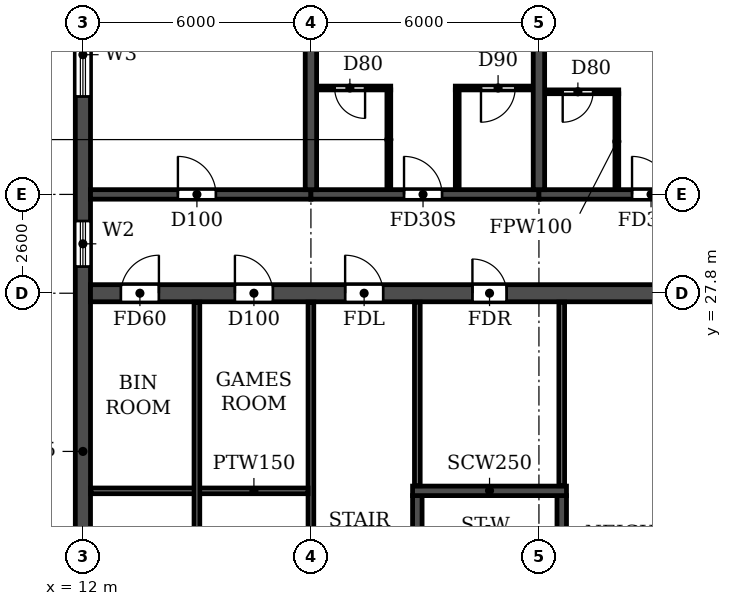
"""IFC4 building model, lengths in metres.
Left out: names, types, materials, properties, quantities, classifications, styles, units other than length and angle.
Written with IfcOpenShell. Run it as: python <this file> out.ifc"""

import sys

from ifc_helpers import new_model, si_unit, direction, frame, frame_2d, origin, place, context, subcontext, project, spatial, rectangle, extrude, element, fill, save


model = new_model("IFC4")
c1 = context("Model", 3, precision=1e-05, world=origin(), true_north=direction((0.0, 1.0)))
c2 = subcontext(c1, "Body", "Model", "MODEL_VIEW")
j1 = project(units=[si_unit("LENGTHUNIT", "METRE"), si_unit("PLANEANGLEUNIT", "RADIAN")], contexts=[c1])
p1 = place(None, origin())
s1 = spatial("IfcSite", under=j1, at=p1, CompositionType="ELEMENT")
p2 = place(p1, origin())
s2 = spatial("IfcBuilding", under=s1, at=p2, CompositionType="ELEMENT")
p3 = place(p2, frame((0.0, 0.0, 125.7)))
s3 = spatial("IfcBuildingStorey", under=s2, at=p3, CompositionType="ELEMENT", Elevation=125.7)
for number, where, z_axis, x_axis in (
    (1, (18.0, 30.525, 0.0), (0.0, 0.0, 1.0), (0.0, 1.0, 0.0)),
    (2, (24.0, 30.525, 0.0), (0.0, 0.0, 1.0), (0.0, 1.0, 0.0)),
):
    element("IfcWall", number, at=place(p3, frame(where, z_axis=z_axis, x_axis=x_axis)), inside=s3, PredefinedType="SHEAR", context=c2, shape_type="SweptSolid", body=[
        extrude(rectangle(XDim=11.675, YDim=0.3, at=frame_2d((5.837, 0.0))), origin(), (0.0, 0.0, 1.0), 3.07),
    ])
p4 = place(p3, frame((12.0, 4.683, 0.0), z_axis=(0.0, 0.0, 1.0), x_axis=(0.0, 1.0, 0.0)))
e3 = element("IfcWall", 3, at=p4, inside=s3, PredefinedType="SHEAR", context=c2, shape_type="SweptSolid", body=[
    extrude(rectangle(XDim=33.034, YDim=0.4, at=frame_2d((16.517, 0.0))), origin(), (0.0, 0.0, 1.0), 3.07),
])
p5 = place(p4, frame((23.817, 0.0, 0.9)))
e4 = element("IfcOpeningElement", 4, at=p5, cuts=e3, PredefinedType="OPENING", context=c2, shape_type="SweptSolid", body=[
    extrude(rectangle(XDim=1.2, YDim=1.5, at=frame_2d((0.6, 0.75))), frame((0.0, 0.21, 0.0), z_axis=(0.0, -1.0, 0.0), x_axis=(1.0, 0.0, 0.0)), (0.0, 0.0, 1.0), 0.42),
])
p6 = place(p4, frame((8.017, 0.0, 0.9)))
e5 = element("IfcOpeningElement", 5, at=p6, cuts=e3, PredefinedType="OPENING", context=c2, shape_type="SweptSolid", body=[
    extrude(rectangle(XDim=1.2, YDim=1.5, at=frame_2d((0.6, 0.75))), frame((0.0, 0.21, 0.0), z_axis=(0.0, -1.0, 0.0), x_axis=(1.0, 0.0, 0.0)), (0.0, 0.0, 1.0), 0.42),
])
p7 = place(p4, frame((28.293, 0.0, 0.6)))
e6 = element("IfcOpeningElement", 6, at=p7, cuts=e3, PredefinedType="OPENING", context=c2, shape_type="SweptSolid", body=[
    extrude(rectangle(XDim=2.2, YDim=1.8, at=frame_2d((1.1, 0.9))), frame((0.0, 0.21, 0.0), z_axis=(0.0, -1.0, 0.0), x_axis=(1.0, 0.0, 0.0)), (0.0, 0.0, 1.0), 0.42),
])
p8 = place(p4, frame((2.541, 0.0, 0.6)))
e7 = element("IfcOpeningElement", 7, at=p8, cuts=e3, PredefinedType="OPENING", context=c2, shape_type="SweptSolid", body=[
    extrude(rectangle(XDim=2.2, YDim=1.8, at=frame_2d((1.1, 0.9))), frame((0.0, 0.21, 0.0), z_axis=(0.0, -1.0, 0.0), x_axis=(1.0, 0.0, 0.0)), (0.0, 0.0, 1.0), 0.42),
])
p9 = place(p4, frame((12.817, 0.0, 0.6)))
e8 = element("IfcOpeningElement", 8, at=p9, cuts=e3, PredefinedType="OPENING", context=c2, shape_type="SweptSolid", body=[
    extrude(rectangle(XDim=2.2, YDim=1.8, at=frame_2d((1.1, 0.9))), frame((0.0, 0.21, 0.0), z_axis=(0.0, -1.0, 0.0), x_axis=(1.0, 0.0, 0.0)), (0.0, 0.0, 1.0), 0.42),
])
p10 = place(p3, frame((12.2, 30.4, 0.0), z_axis=(0.0, 0.0, 1.0), x_axis=(1.0, 0.0, 0.0)))
e9 = element("IfcWall", 9, at=p10, inside=s3, PredefinedType="SHEAR", context=c2, shape_type="SweptSolid", body=[
    extrude(rectangle(XDim=5.8, YDim=0.25, at=frame_2d((2.9, 0.0))), origin(), (0.0, 0.0, 1.0), 2.47),
])
p11 = place(p10, frame((2.3, 0.0, 0.0)))
e10 = element("IfcOpeningElement", 10, at=p11, cuts=e9, PredefinedType="OPENING", context=c2, shape_type="SweptSolid", body=[
    extrude(rectangle(XDim=1.0, YDim=2.1, at=frame_2d((0.5, 1.05))), frame((0.0, 0.135, 0.0), z_axis=(0.0, -1.0, 0.0), x_axis=(1.0, 0.0, 0.0)), (0.0, 0.0, 1.0), 0.27),
])
p12 = place(p3, frame((18.0, 30.4, 0.0), z_axis=(0.0, 0.0, 1.0), x_axis=(1.0, 0.0, 0.0)))
e11 = element("IfcWall", 11, at=p12, inside=s3, PredefinedType="SHEAR", context=c2, shape_type="SweptSolid", body=[
    extrude(rectangle(XDim=6.0, YDim=0.25, at=frame_2d((3.0, 0.0))), origin(), (0.0, 0.0, 1.0), 2.47),
])
p13 = place(p12, frame((2.45, 0.0, 0.0)))
e12 = element("IfcOpeningElement", 12, at=p13, cuts=e11, PredefinedType="OPENING", context=c2, shape_type="SweptSolid", body=[
    extrude(rectangle(XDim=1.0, YDim=2.1, at=frame_2d((0.5, 1.05))), frame((0.0, 0.135, 0.0), z_axis=(0.0, -1.0, 0.0), x_axis=(1.0, 0.0, 0.0)), (0.0, 0.0, 1.0), 0.27),
])
p14 = place(p3, frame((24.0, 30.4, 0.0), z_axis=(0.0, 0.0, 1.0), x_axis=(1.0, 0.0, 0.0)))
e13 = element("IfcWall", 13, at=p14, inside=s3, PredefinedType="SHEAR", context=c2, shape_type="SweptSolid", body=[
    extrude(rectangle(XDim=6.0, YDim=0.25, at=frame_2d((3.0, 0.0))), origin(), (0.0, 0.0, 1.0), 2.47),
])
p15 = place(p14, frame((2.45, 0.0, 0.0)))
e14 = element("IfcOpeningElement", 14, at=p15, cuts=e13, PredefinedType="OPENING", context=c2, shape_type="SweptSolid", body=[
    extrude(rectangle(XDim=1.0, YDim=2.1, at=frame_2d((0.5, 1.05))), frame((0.0, 0.135, 0.0), z_axis=(0.0, -1.0, 0.0), x_axis=(1.0, 0.0, 0.0)), (0.0, 0.0, 1.0), 0.27),
])
p16 = place(p3, frame((12.2, 27.8, 0.0), z_axis=(0.0, 0.0, 1.0), x_axis=(1.0, 0.0, 0.0)))
e15 = element("IfcWall", 15, at=p16, inside=s3, PredefinedType="SOLIDWALL", context=c2, shape_type="SweptSolid", body=[
    extrude(rectangle(XDim=77.6, YDim=0.45, at=frame_2d((38.8, 0.0))), origin(), (0.0, 0.0, 1.0), 3.07),
])
p17 = place(p16, frame((0.8, 0.0, 0.0)))
e16 = element("IfcOpeningElement", 16, at=p17, cuts=e15, PredefinedType="OPENING", context=c2, shape_type="SweptSolid", body=[
    extrude(rectangle(XDim=1.0, YDim=2.1, at=frame_2d((0.5, 1.05))), frame((0.0, 0.235, 0.0), z_axis=(0.0, -1.0, 0.0), x_axis=(1.0, 0.0, 0.0)), (0.0, 0.0, 1.0), 0.47),
])
p18 = place(p16, frame((3.8, 0.0, 0.0)))
e17 = element("IfcOpeningElement", 17, at=p18, cuts=e15, PredefinedType="OPENING", context=c2, shape_type="SweptSolid", body=[
    extrude(rectangle(XDim=1.0, YDim=2.1, at=frame_2d((0.5, 1.05))), frame((0.0, 0.235, 0.0), z_axis=(0.0, -1.0, 0.0), x_axis=(1.0, 0.0, 0.0)), (0.0, 0.0, 1.0), 0.47),
])
p19 = place(p16, frame((6.7, 0.0, 0.0)))
e18 = element("IfcOpeningElement", 18, at=p19, cuts=e15, PredefinedType="OPENING", context=c2, shape_type="SweptSolid", body=[
    extrude(rectangle(XDim=1.0, YDim=2.1, at=frame_2d((0.5, 1.05))), frame((0.0, 0.235, 0.0), z_axis=(0.0, -1.0, 0.0), x_axis=(1.0, 0.0, 0.0)), (0.0, 0.0, 1.0), 0.47),
])
p20 = place(p16, frame((10.05, 0.0, 0.0)))
e19 = element("IfcOpeningElement", 19, at=p20, cuts=e15, PredefinedType="OPENING", context=c2, shape_type="SweptSolid", body=[
    extrude(rectangle(XDim=0.9, YDim=2.1, at=frame_2d((0.45, 1.05))), frame((0.0, 0.235, 0.0), z_axis=(0.0, -1.0, 0.0), x_axis=(1.0, 0.0, 0.0)), (0.0, 0.0, 1.0), 0.47),
])
p21 = place(p16, frame((19.25, 0.0, 0.0)))
e20 = element("IfcOpeningElement", 20, at=p21, cuts=e15, PredefinedType="OPENING", context=c2, shape_type="SweptSolid", body=[
    extrude(rectangle(XDim=0.9, YDim=2.1, at=frame_2d((0.45, 1.05))), frame((0.0, 0.235, 0.0), z_axis=(0.0, -1.0, 0.0), x_axis=(1.0, 0.0, 0.0)), (0.0, 0.0, 1.0), 0.47),
])
p22 = place(p16, frame((25.0, 0.0, 0.0)))
e21 = element("IfcOpeningElement", 21, at=p22, cuts=e15, PredefinedType="OPENING", context=c2, shape_type="SweptSolid", body=[
    extrude(rectangle(XDim=1.0, YDim=2.1, at=frame_2d((0.5, 1.05))), frame((0.0, 0.235, 0.0), z_axis=(0.0, -1.0, 0.0), x_axis=(1.0, 0.0, 0.0)), (0.0, 0.0, 1.0), 0.47),
])
p23 = place(p16, frame((30.2, 0.0, 0.0)))
e22 = element("IfcOpeningElement", 22, at=p23, cuts=e15, PredefinedType="OPENING", context=c2, shape_type="SweptSolid", body=[
    extrude(rectangle(XDim=1.0, YDim=2.1, at=frame_2d((0.5, 1.05))), frame((0.0, 0.235, 0.0), z_axis=(0.0, -1.0, 0.0), x_axis=(1.0, 0.0, 0.0)), (0.0, 0.0, 1.0), 0.47),
])
p24 = place(p16, frame((35.4, 0.0, 0.0)))
e23 = element("IfcOpeningElement", 23, at=p24, cuts=e15, PredefinedType="OPENING", context=c2, shape_type="SweptSolid", body=[
    extrude(rectangle(XDim=1.0, YDim=2.1, at=frame_2d((0.5, 1.05))), frame((0.0, 0.235, 0.0), z_axis=(0.0, -1.0, 0.0), x_axis=(1.0, 0.0, 0.0)), (0.0, 0.0, 1.0), 0.47),
])
p25 = place(p16, frame((38.3, 0.0, 0.0)))
e24 = element("IfcOpeningElement", 24, at=p25, cuts=e15, PredefinedType="OPENING", context=c2, shape_type="SweptSolid", body=[
    extrude(rectangle(XDim=1.0, YDim=2.1, at=frame_2d((0.5, 1.05))), frame((0.0, 0.235, 0.0), z_axis=(0.0, -1.0, 0.0), x_axis=(1.0, 0.0, 0.0)), (0.0, 0.0, 1.0), 0.47),
])
p26 = place(p16, frame((42.5, 0.0, 0.0)))
e25 = element("IfcOpeningElement", 25, at=p26, cuts=e15, PredefinedType="OPENING", context=c2, shape_type="SweptSolid", body=[
    extrude(rectangle(XDim=1.0, YDim=2.1, at=frame_2d((0.5, 1.05))), frame((0.0, 0.235, 0.0), z_axis=(0.0, -1.0, 0.0), x_axis=(1.0, 0.0, 0.0)), (0.0, 0.0, 1.0), 0.47),
])
p27 = place(p16, frame((46.4, 0.0, 0.0)))
e26 = element("IfcOpeningElement", 26, at=p27, cuts=e15, PredefinedType="OPENING", context=c2, shape_type="SweptSolid", body=[
    extrude(rectangle(XDim=1.0, YDim=2.1, at=frame_2d((0.5, 1.05))), frame((0.0, 0.235, 0.0), z_axis=(0.0, -1.0, 0.0), x_axis=(1.0, 0.0, 0.0)), (0.0, 0.0, 1.0), 0.47),
])
p28 = place(p16, frame((49.0, 0.0, 0.0)))
e27 = element("IfcOpeningElement", 27, at=p28, cuts=e15, PredefinedType="OPENING", context=c2, shape_type="SweptSolid", body=[
    extrude(rectangle(XDim=1.0, YDim=2.1, at=frame_2d((0.5, 1.05))), frame((0.0, 0.235, 0.0), z_axis=(0.0, -1.0, 0.0), x_axis=(1.0, 0.0, 0.0)), (0.0, 0.0, 1.0), 0.47),
])
p29 = place(p16, frame((52.65, 0.0, 0.0)))
e28 = element("IfcOpeningElement", 28, at=p29, cuts=e15, PredefinedType="OPENING", context=c2, shape_type="SweptSolid", body=[
    extrude(rectangle(XDim=1.5, YDim=2.1, at=frame_2d((0.75, 1.05))), frame((0.0, 0.235, 0.0), z_axis=(0.0, -1.0, 0.0), x_axis=(1.0, 0.0, 0.0)), (0.0, 0.0, 1.0), 0.47),
])
p30 = place(p16, frame((57.45, 0.0, 0.0)))
e29 = element("IfcOpeningElement", 29, at=p30, cuts=e15, PredefinedType="OPENING", context=c2, shape_type="SweptSolid", body=[
    extrude(rectangle(XDim=0.9, YDim=2.1, at=frame_2d((0.45, 1.05))), frame((0.0, 0.235, 0.0), z_axis=(0.0, -1.0, 0.0), x_axis=(1.0, 0.0, 0.0)), (0.0, 0.0, 1.0), 0.47),
])
p31 = place(p16, frame((66.65, 0.0, 0.0)))
e30 = element("IfcOpeningElement", 30, at=p31, cuts=e15, PredefinedType="OPENING", context=c2, shape_type="SweptSolid", body=[
    extrude(rectangle(XDim=0.9, YDim=2.1, at=frame_2d((0.45, 1.05))), frame((0.0, 0.235, 0.0), z_axis=(0.0, -1.0, 0.0), x_axis=(1.0, 0.0, 0.0)), (0.0, 0.0, 1.0), 0.47),
])
p32 = place(p16, frame((69.9, 0.0, 0.0)))
e31 = element("IfcOpeningElement", 31, at=p32, cuts=e15, PredefinedType="OPENING", context=c2, shape_type="SweptSolid", body=[
    extrude(rectangle(XDim=1.0, YDim=2.1, at=frame_2d((0.5, 1.05))), frame((0.0, 0.235, 0.0), z_axis=(0.0, -1.0, 0.0), x_axis=(1.0, 0.0, 0.0)), (0.0, 0.0, 1.0), 0.47),
])
p33 = place(p16, frame((72.8, 0.0, 0.0)))
e32 = element("IfcOpeningElement", 32, at=p33, cuts=e15, PredefinedType="OPENING", context=c2, shape_type="SweptSolid", body=[
    extrude(rectangle(XDim=1.0, YDim=2.1, at=frame_2d((0.5, 1.05))), frame((0.0, 0.235, 0.0), z_axis=(0.0, -1.0, 0.0), x_axis=(1.0, 0.0, 0.0)), (0.0, 0.0, 1.0), 0.47),
])
p34 = place(p16, frame((75.8, 0.0, 0.0)))
e33 = element("IfcOpeningElement", 33, at=p34, cuts=e15, PredefinedType="OPENING", context=c2, shape_type="SweptSolid", body=[
    extrude(rectangle(XDim=1.0, YDim=2.1, at=frame_2d((0.5, 1.05))), frame((0.0, 0.235, 0.0), z_axis=(0.0, -1.0, 0.0), x_axis=(1.0, 0.0, 0.0)), (0.0, 0.0, 1.0), 0.47),
])
p35 = place(p3, frame((20.8, 14.825, 0.0), z_axis=(0.0, 0.0, 1.0), x_axis=(0.0, 1.0, 0.0)))
e34 = element("IfcWall", 34, at=p35, inside=s3, PredefinedType="SOLIDWALL", context=c2, shape_type="SweptSolid", body=[
    extrude(rectangle(XDim=7.65, YDim=0.25, at=frame_2d((3.825, 0.0))), origin(), (0.0, 0.0, 1.0), 3.07),
])
p36 = place(p35, frame((0.475, 0.0, 0.0)))
e35 = element("IfcOpeningElement", 35, at=p36, cuts=e34, PredefinedType="OPENING", context=c2, shape_type="SweptSolid", body=[
    extrude(rectangle(XDim=1.0, YDim=2.1, at=frame_2d((0.5, 1.05))), frame((0.0, 0.135, 0.0), z_axis=(0.0, -1.0, 0.0), x_axis=(1.0, 0.0, 0.0)), (0.0, 0.0, 1.0), 0.27),
])
p37 = place(p3, frame((24.6, 14.825, 0.0), z_axis=(0.0, 0.0, 1.0), x_axis=(0.0, 1.0, 0.0)))
e36 = element("IfcWall", 36, at=p37, inside=s3, PredefinedType="SOLIDWALL", context=c2, shape_type="SweptSolid", body=[
    extrude(rectangle(XDim=7.65, YDim=0.25, at=frame_2d((3.825, 0.0))), origin(), (0.0, 0.0, 1.0), 3.07),
])
p38 = place(p3, frame((20.675, 22.6, 0.0), z_axis=(0.0, 0.0, 1.0), x_axis=(1.0, 0.0, 0.0)))
e37 = element("IfcWall", 37, at=p38, inside=s3, PredefinedType="SOLIDWALL", context=c2, shape_type="SweptSolid", body=[
    extrude(rectangle(XDim=4.05, YDim=0.25, at=frame_2d((2.025, 0.0))), origin(), (0.0, 0.0, 1.0), 3.07),
])
p39 = place(p3, frame((18.0, 14.835, 0.0), z_axis=(0.0, 0.0, 1.0), x_axis=(0.0, 1.0, 0.0)))
e38 = element("IfcWall", 38, at=p39, inside=s3, PredefinedType="PARTITIONING", context=c2, shape_type="SweptSolid", body=[
    extrude(rectangle(XDim=12.73, YDim=0.15, at=frame_2d((6.365, 0.0))), origin(), (0.0, 0.0, 1.0), 3.07),
])
p40 = place(p3, frame((24.16, 33.1, 0.0), z_axis=(0.0, 0.0, 1.0), x_axis=(1.0, 0.0, 0.0)))
e39 = element("IfcWall", 39, at=p40, inside=s3, PredefinedType="PARTITIONING", context=c2, shape_type="SweptSolid", body=[
    extrude(rectangle(XDim=1.94, YDim=0.1, at=frame_2d((0.97, 0.0))), origin(), (0.0, 0.0, 1.0), 3.07),
])
p41 = place(p40, frame((0.465, 0.0, 0.0)))
e40 = element("IfcOpeningElement", 40, at=p41, cuts=e39, PredefinedType="OPENING", context=c2, shape_type="SweptSolid", body=[
    extrude(rectangle(XDim=0.8, YDim=2.1, at=frame_2d((0.4, 1.05))), frame((0.0, 0.06, 0.0), z_axis=(0.0, -1.0, 0.0), x_axis=(1.0, 0.0, 0.0)), (0.0, 0.0, 1.0), 0.12),
])
p42 = place(p3, frame((18.16, 33.2, 0.0), z_axis=(0.0, 0.0, 1.0), x_axis=(1.0, 0.0, 0.0)))
e41 = element("IfcWall", 41, at=p42, inside=s3, PredefinedType="PARTITIONING", context=c2, shape_type="SweptSolid", body=[
    extrude(rectangle(XDim=1.94, YDim=0.1, at=frame_2d((0.97, 0.0))), origin(), (0.0, 0.0, 1.0), 3.07),
])
p43 = place(p42, frame((0.465, 0.0, 0.0)))
e42 = element("IfcOpeningElement", 42, at=p43, cuts=e41, PredefinedType="OPENING", context=c2, shape_type="SweptSolid", body=[
    extrude(rectangle(XDim=0.8, YDim=2.1, at=frame_2d((0.4, 1.05))), frame((0.0, 0.06, 0.0), z_axis=(0.0, -1.0, 0.0), x_axis=(1.0, 0.0, 0.0)), (0.0, 0.0, 1.0), 0.12),
])
p44 = place(p3, frame((21.8, 33.2, 0.0), z_axis=(0.0, 0.0, 1.0), x_axis=(1.0, 0.0, 0.0)))
e43 = element("IfcWall", 43, at=p44, inside=s3, PredefinedType="PARTITIONING", context=c2, shape_type="SweptSolid", body=[
    extrude(rectangle(XDim=2.04, YDim=0.1, at=frame_2d((1.02, 0.0))), origin(), (0.0, 0.0, 1.0), 3.07),
])
p45 = place(p44, frame((0.675, 0.0, 0.0)))
e44 = element("IfcOpeningElement", 44, at=p45, cuts=e43, PredefinedType="OPENING", context=c2, shape_type="SweptSolid", body=[
    extrude(rectangle(XDim=0.9, YDim=2.1, at=frame_2d((0.45, 1.05))), frame((0.0, 0.06, 0.0), z_axis=(0.0, -1.0, 0.0), x_axis=(1.0, 0.0, 0.0)), (0.0, 0.0, 1.0), 0.12),
])
for number, where, z_axis, x_axis in (
    (45, (20.05, 30.535, 0.0), (0.0, 0.0, 1.0), (0.0, 1.0, 0.0)),
    (46, (21.85, 30.535, 0.0), (0.0, 0.0, 1.0), (0.0, 1.0, 0.0)),
):
    element("IfcWall", number, at=place(p3, frame(where, z_axis=z_axis, x_axis=x_axis)), inside=s3, PredefinedType="PARTITIONING", context=c2, shape_type="SweptSolid", body=[
        extrude(rectangle(XDim=2.615, YDim=0.1, at=frame_2d((1.308, 0.0))), origin(), (0.0, 0.0, 1.0), 3.07),
    ])
p46 = place(p3, frame((26.05, 30.535, 0.0), z_axis=(0.0, 0.0, 1.0), x_axis=(0.0, 1.0, 0.0)))
e47 = element("IfcWall", 47, at=p46, inside=s3, PredefinedType="PARTITIONING", context=c2, shape_type="SweptSolid", body=[
    extrude(rectangle(XDim=2.515, YDim=0.1, at=frame_2d((1.258, 0.0))), origin(), (0.0, 0.0, 1.0), 3.07),
])
p47 = place(p3, frame((12.21, 22.6, 0.0), z_axis=(0.0, 0.0, 1.0), x_axis=(1.0, 0.0, 0.0)))
e48 = element("IfcWall", 48, at=p47, inside=s3, PredefinedType="PARTITIONING", context=c2, shape_type="SweptSolid", body=[
    extrude(rectangle(XDim=5.715, YDim=0.15, at=frame_2d((2.857, 0.0))), origin(), (0.0, 0.0, 1.0), 3.07),
])
p48 = place(p3, frame((15.0, 14.835, 0.0), z_axis=(0.0, 0.0, 1.0), x_axis=(0.0, 1.0, 0.0)))
e49 = element("IfcWall", 49, at=p48, inside=s3, PredefinedType="PARTITIONING", context=c2, shape_type="SweptSolid", body=[
    extrude(rectangle(XDim=12.73, YDim=0.15, at=frame_2d((6.365, 0.0))), origin(), (0.0, 0.0, 1.0), 3.07),
])
for number, where, z_axis, x_axis in (
    (50, (20.8, 22.735, 0.0), (0.0, 0.0, 1.0), (0.0, 1.0, 0.0)),
    (51, (24.6, 22.735, 0.0), (0.0, 0.0, 1.0), (0.0, 1.0, 0.0)),
):
    element("IfcWall", number, at=place(p3, frame(where, z_axis=z_axis, x_axis=x_axis)), inside=s3, PredefinedType="PARTITIONING", context=c2, shape_type="SweptSolid", body=[
        extrude(rectangle(XDim=4.83, YDim=0.15, at=frame_2d((2.415, 0.0))), origin(), (0.0, 0.0, 1.0), 3.07),
    ])
p49 = place(p5, origin())
e52 = element("IfcWindow", 52, at=p49, inside=s3, PartitioningType="SINGLE_PANEL", PredefinedType="WINDOW", context=c2, shape_type="SweptSolid", body=[
    extrude(rectangle(XDim=1.2, YDim=1.5, at=frame_2d((0.6, 0.75))), frame((0.0, 0.03, 0.0), z_axis=(0.0, -1.0, 0.0), x_axis=(1.0, 0.0, 0.0)), (0.0, 0.0, 1.0), 0.06),
])
fill(e4, e52)
p50 = place(p7, origin())
e53 = element("IfcWindow", 53, at=p50, inside=s3, PartitioningType="DOUBLE_PANEL_HORIZONTAL", PredefinedType="WINDOW", context=c2, shape_type="SweptSolid", body=[
    extrude(rectangle(XDim=2.2, YDim=1.8, at=frame_2d((1.1, 0.9))), frame((0.0, 0.03, 0.0), z_axis=(0.0, -1.0, 0.0), x_axis=(1.0, 0.0, 0.0)), (0.0, 0.0, 1.0), 0.06),
])
fill(e6, e53)
p51 = place(p17, origin())
e54 = element("IfcDoor", 54, at=p51, inside=s3, OperationType="SINGLE_SWING_RIGHT", PredefinedType="DOOR", context=c2, shape_type="SweptSolid", body=[
    extrude(rectangle(XDim=1.0, YDim=2.1, at=frame_2d((0.5, 1.05))), frame((0.0, 0.025, 0.0), z_axis=(0.0, -1.0, 0.0), x_axis=(1.0, 0.0, 0.0)), (0.0, 0.0, 1.0), 0.05),
])
fill(e16, e54)
p52 = place(p18, origin())
e55 = element("IfcDoor", 55, at=p52, inside=s3, OperationType="SINGLE_SWING_LEFT", PredefinedType="DOOR", context=c2, shape_type="SweptSolid", body=[
    extrude(rectangle(XDim=1.0, YDim=2.1, at=frame_2d((0.5, 1.05))), frame((0.0, 0.025, 0.0), z_axis=(0.0, -1.0, 0.0), x_axis=(1.0, 0.0, 0.0)), (0.0, 0.0, 1.0), 0.05),
])
fill(e17, e55)
p53 = place(p19, origin())
e56 = element("IfcDoor", 56, at=p53, inside=s3, OperationType="SINGLE_SWING_LEFT", PredefinedType="DOOR", context=c2, shape_type="SweptSolid", body=[
    extrude(rectangle(XDim=1.0, YDim=2.1, at=frame_2d((0.5, 1.05))), frame((0.0, 0.025, 0.0), z_axis=(0.0, -1.0, 0.0), x_axis=(1.0, 0.0, 0.0)), (0.0, 0.0, 1.0), 0.05),
])
fill(e18, e56)
p54 = place(p20, origin())
e57 = element("IfcDoor", 57, at=p54, inside=s3, OperationType="SINGLE_SWING_LEFT", PredefinedType="DOOR", context=c2, shape_type="SweptSolid", body=[
    extrude(rectangle(XDim=0.9, YDim=2.1, at=frame_2d((0.45, 1.05))), frame((0.0, 0.025, 0.0), z_axis=(0.0, -1.0, 0.0), x_axis=(1.0, 0.0, 0.0)), (0.0, 0.0, 1.0), 0.05),
])
fill(e19, e57)
p55 = place(p11, origin())
e58 = element("IfcDoor", 58, at=p55, inside=s3, OperationType="SINGLE_SWING_LEFT", PredefinedType="DOOR", context=c2, shape_type="SweptSolid", body=[
    extrude(rectangle(XDim=1.0, YDim=2.1, at=frame_2d((0.5, 1.05))), frame((0.0, 0.025, 0.0), z_axis=(0.0, -1.0, 0.0), x_axis=(1.0, 0.0, 0.0)), (0.0, 0.0, 1.0), 0.05),
])
fill(e10, e58)
p56 = place(p43, frame((0.8, 0.0, 0.0), z_axis=(0.0, 0.0, 1.0), x_axis=(-1.0, 0.0, 0.0)))
e59 = element("IfcDoor", 59, at=p56, inside=s3, OperationType="SINGLE_SWING_LEFT", PredefinedType="DOOR", context=c2, shape_type="SweptSolid", body=[
    extrude(rectangle(XDim=0.8, YDim=2.1, at=frame_2d((0.4, 1.05))), frame((0.0, 0.025, 0.0), z_axis=(0.0, -1.0, 0.0), x_axis=(1.0, 0.0, 0.0)), (0.0, 0.0, 1.0), 0.05),
])
fill(e42, e59)
p57 = place(p13, origin())
e60 = element("IfcDoor", 60, at=p57, inside=s3, OperationType="SINGLE_SWING_LEFT", PredefinedType="DOOR", context=c2, shape_type="SweptSolid", body=[
    extrude(rectangle(XDim=1.0, YDim=2.1, at=frame_2d((0.5, 1.05))), frame((0.0, 0.025, 0.0), z_axis=(0.0, -1.0, 0.0), x_axis=(1.0, 0.0, 0.0)), (0.0, 0.0, 1.0), 0.05),
])
fill(e12, e60)
p58 = place(p45, frame((0.9, 0.0, 0.0), z_axis=(0.0, 0.0, 1.0), x_axis=(-1.0, 0.0, 0.0)))
e61 = element("IfcDoor", 61, at=p58, inside=s3, OperationType="SINGLE_SWING_RIGHT", PredefinedType="DOOR", context=c2, shape_type="SweptSolid", body=[
    extrude(rectangle(XDim=0.9, YDim=2.1, at=frame_2d((0.45, 1.05))), frame((0.0, 0.025, 0.0), z_axis=(0.0, -1.0, 0.0), x_axis=(1.0, 0.0, 0.0)), (0.0, 0.0, 1.0), 0.05),
])
fill(e44, e61)
p59 = place(p41, frame((0.8, 0.0, 0.0), z_axis=(0.0, 0.0, 1.0), x_axis=(-1.0, 0.0, 0.0)))
e62 = element("IfcDoor", 62, at=p59, inside=s3, OperationType="SINGLE_SWING_RIGHT", PredefinedType="DOOR", context=c2, shape_type="SweptSolid", body=[
    extrude(rectangle(XDim=0.8, YDim=2.1, at=frame_2d((0.4, 1.05))), frame((0.0, 0.025, 0.0), z_axis=(0.0, -1.0, 0.0), x_axis=(1.0, 0.0, 0.0)), (0.0, 0.0, 1.0), 0.05),
])
fill(e40, e62)
p60 = place(p15, origin())
e63 = element("IfcDoor", 63, at=p60, inside=s3, OperationType="SINGLE_SWING_LEFT", PredefinedType="DOOR", context=c2, shape_type="SweptSolid", body=[
    extrude(rectangle(XDim=1.0, YDim=2.1, at=frame_2d((0.5, 1.05))), frame((0.0, 0.025, 0.0), z_axis=(0.0, -1.0, 0.0), x_axis=(1.0, 0.0, 0.0)), (0.0, 0.0, 1.0), 0.05),
])
fill(e14, e63)
save(model, sys.argv[1])
